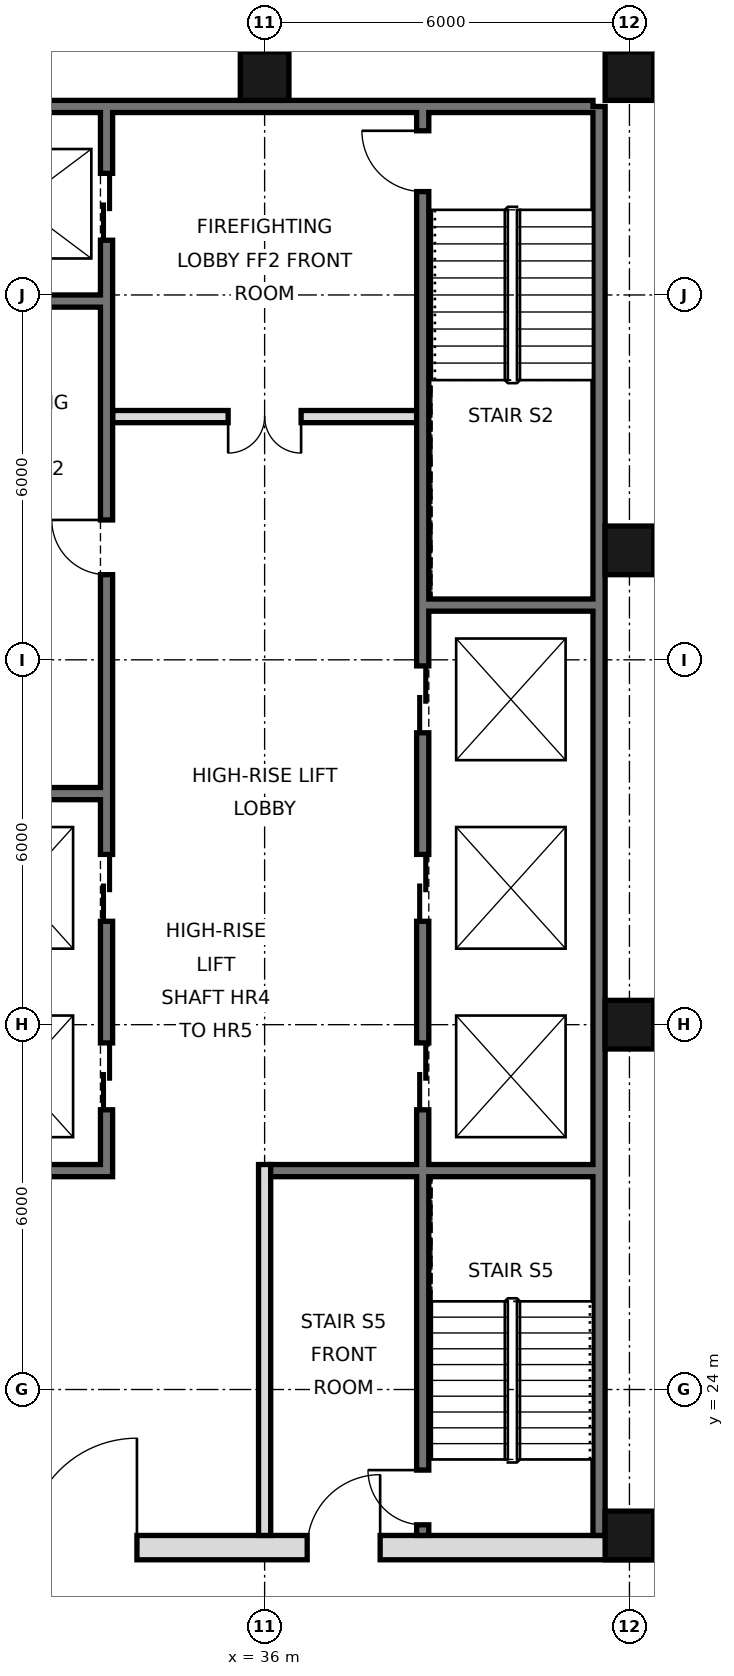
"""IFC4 building model, lengths in metres.
Left out: names, types, materials, properties, quantities, classifications, styles, units other than length and angle.
Written with IfcOpenShell. Run it as: python <this file> out.ifc"""

import sys

from ifc_helpers import new_model, si_unit, direction, frame, frame_2d, origin, origin_2d, place, context, subcontext, project, spatial, rectangle, hollow_rectangle, extrude, element, fill, save


model = new_model("IFC4")
c1 = context("Model", 3, precision=1e-05, world=origin(), true_north=direction((0.0, 1.0)))
c2 = subcontext(c1, "Body", "Model", "MODEL_VIEW")
j1 = project(units=[si_unit("LENGTHUNIT", "METRE"), si_unit("PLANEANGLEUNIT", "RADIAN")], contexts=[c1])
p1 = place(None, origin())
s1 = spatial("IfcSite", under=j1, at=p1, CompositionType="ELEMENT")
p2 = place(p1, origin())
s2 = spatial("IfcBuilding", under=s1, at=p2, CompositionType="ELEMENT")
p3 = place(p2, frame((0.0, 0.0, 294.4)))
s3 = spatial("IfcBuildingStorey", under=s2, at=p3, CompositionType="ELEMENT", Elevation=294.4)
for number, where, z_axis, x_axis in (
    (1, (36.0, 45.6, 0.0), (0.0, 0.0, 1.0), (1.0, 0.0, 0.0)),
    (2, (42.0, 21.6, 0.0), (0.0, 0.0, 1.0), (1.0, 0.0, 0.0)),
    (3, (42.0, 30.0, 0.0), (0.0, 0.0, 1.0), (1.0, 0.0, 0.0)),
    (4, (42.0, 37.8, 0.0), (0.0, 0.0, 1.0), (1.0, 0.0, 0.0)),
    (5, (42.0, 45.6, 0.0), (0.0, 0.0, 1.0), (1.0, 0.0, 0.0)),
):
    element("IfcColumn", number, at=place(p3, frame(where, z_axis=z_axis, x_axis=x_axis)), inside=s3, PredefinedType="COLUMN", context=c2, shape_type="SweptSolid", body=[
        extrude(hollow_rectangle(XDim=0.8, YDim=0.8, WallThickness=0.032, at=origin_2d()), origin(), (0.0, 0.0, 1.0), 3.6),
    ])
p4 = place(p3, frame((41.5, 21.6, 0.0), z_axis=(0.0, 0.0, 1.0), x_axis=(0.0, 1.0, 0.0)))
e6 = element("IfcWall", 6, at=p4, inside=s3, PredefinedType="SOLIDWALL", context=c2, shape_type="SweptSolid", body=[
    extrude(rectangle(XDim=23.5, YDim=0.2, at=frame_2d((11.75, 0.0))), origin(), (0.0, 0.0, 1.0), 3.42),
])
p5 = place(p3, frame((6.6, 45.1, 0.0), z_axis=(0.0, 0.0, 1.0), x_axis=(1.0, 0.0, 0.0)))
e7 = element("IfcWall", 7, at=p5, inside=s3, PredefinedType="SOLIDWALL", context=c2, shape_type="SweptSolid", body=[
    extrude(rectangle(XDim=34.8, YDim=0.2, at=frame_2d((17.4, 0.0))), origin(), (0.0, 0.0, 1.0), 3.42),
])
p6 = place(p3, frame((5.6, 21.4, 0.0), z_axis=(0.0, 0.0, 1.0), x_axis=(1.0, 0.0, 0.0)))
e8 = element("IfcWall", 8, at=p6, inside=s3, PredefinedType="SOLIDWALL", context=c2, shape_type="SweptSolid", body=[
    extrude(rectangle(XDim=36.8, YDim=0.4, at=frame_2d((18.4, 0.0))), origin(), (0.0, 0.0, 1.0), 3.42),
])
p7 = place(p6, frame((8.5, 0.0, 0.0)))
e9 = element("IfcOpeningElement", 9, at=p7, cuts=e8, PredefinedType="OPENING", context=c2, shape_type="SweptSolid", body=[
    extrude(rectangle(XDim=1.8, YDim=2.1, at=frame_2d((0.9, 1.05))), frame((0.0, 0.21, 0.0), z_axis=(0.0, -1.0, 0.0), x_axis=(1.0, 0.0, 0.0)), (0.0, 0.0, 1.0), 0.42),
])
p8 = place(p6, frame((17.5, 0.0, 0.0)))
e10 = element("IfcOpeningElement", 10, at=p8, cuts=e8, PredefinedType="OPENING", context=c2, shape_type="SweptSolid", body=[
    extrude(rectangle(XDim=1.8, YDim=2.1, at=frame_2d((0.9, 1.05))), frame((0.0, 0.21, 0.0), z_axis=(0.0, -1.0, 0.0), x_axis=(1.0, 0.0, 0.0)), (0.0, 0.0, 1.0), 0.42),
])
p9 = place(p6, frame((26.5, 0.0, 0.0)))
e11 = element("IfcOpeningElement", 11, at=p9, cuts=e8, PredefinedType="OPENING", context=c2, shape_type="SweptSolid", body=[
    extrude(rectangle(XDim=1.8, YDim=2.1, at=frame_2d((0.9, 1.05))), frame((0.0, 0.21, 0.0), z_axis=(0.0, -1.0, 0.0), x_axis=(1.0, 0.0, 0.0)), (0.0, 0.0, 1.0), 0.42),
])
p10 = place(p6, frame((4.5, 0.0, 0.0)))
e12 = element("IfcOpeningElement", 12, at=p10, cuts=e8, PredefinedType="OPENING", context=c2, shape_type="SweptSolid", body=[
    extrude(rectangle(XDim=1.2, YDim=2.1, at=frame_2d((0.6, 1.05))), frame((0.0, 0.21, 0.0), z_axis=(0.0, -1.0, 0.0), x_axis=(1.0, 0.0, 0.0)), (0.0, 0.0, 1.0), 0.42),
])
p11 = place(p6, frame((31.1, 0.0, 0.0)))
e13 = element("IfcOpeningElement", 13, at=p11, cuts=e8, PredefinedType="OPENING", context=c2, shape_type="SweptSolid", body=[
    extrude(rectangle(XDim=1.2, YDim=2.1, at=frame_2d((0.6, 1.05))), frame((0.0, 0.21, 0.0), z_axis=(0.0, -1.0, 0.0), x_axis=(1.0, 0.0, 0.0)), (0.0, 0.0, 1.0), 0.42),
])
p12 = place(p3, frame((33.4, 27.5, 0.0), z_axis=(0.0, 0.0, 1.0), x_axis=(0.0, 1.0, 0.0)))
e14 = element("IfcWall", 14, at=p12, inside=s3, PredefinedType="SOLIDWALL", context=c2, shape_type="SweptSolid", body=[
    extrude(rectangle(XDim=17.5, YDim=0.2, at=frame_2d((8.75, 0.0))), origin(), (0.0, 0.0, 1.0), 3.42),
])
p13 = place(p12, frame((1.1, 0.0, 0.0)))
e15 = element("IfcOpeningElement", 15, at=p13, cuts=e14, PredefinedType="OPENING", context=c2, shape_type="SweptSolid", body=[
    extrude(rectangle(XDim=1.1, YDim=2.1, at=frame_2d((0.55, 1.05))), frame((0.0, 0.11, 0.0), z_axis=(0.0, -1.0, 0.0), x_axis=(1.0, 0.0, 0.0)), (0.0, 0.0, 1.0), 0.22),
])
p14 = place(p12, frame((4.2, 0.0, 0.0)))
e16 = element("IfcOpeningElement", 16, at=p14, cuts=e14, PredefinedType="OPENING", context=c2, shape_type="SweptSolid", body=[
    extrude(rectangle(XDim=1.1, YDim=2.1, at=frame_2d((0.55, 1.05))), frame((0.0, 0.11, 0.0), z_axis=(0.0, -1.0, 0.0), x_axis=(1.0, 0.0, 0.0)), (0.0, 0.0, 1.0), 0.22),
])
p15 = place(p12, frame((15.4, 0.0, 0.0)))
e17 = element("IfcOpeningElement", 17, at=p15, cuts=e14, PredefinedType="OPENING", context=c2, shape_type="SweptSolid", body=[
    extrude(rectangle(XDim=1.1, YDim=2.1, at=frame_2d((0.55, 1.05))), frame((0.0, 0.11, 0.0), z_axis=(0.0, -1.0, 0.0), x_axis=(1.0, 0.0, 0.0)), (0.0, 0.0, 1.0), 0.22),
])
p16 = place(p12, frame((9.9, 0.0, 0.0)))
e18 = element("IfcOpeningElement", 18, at=p16, cuts=e14, PredefinedType="OPENING", context=c2, shape_type="SweptSolid", body=[
    extrude(rectangle(XDim=0.9, YDim=2.1, at=frame_2d((0.45, 1.05))), frame((0.0, 0.11, 0.0), z_axis=(0.0, -1.0, 0.0), x_axis=(1.0, 0.0, 0.0)), (0.0, 0.0, 1.0), 0.22),
])
p17 = place(p3, frame((36.0, 21.6, 0.0), z_axis=(0.0, 0.0, 1.0), x_axis=(0.0, 1.0, 0.0)))
e19 = element("IfcWall", 19, at=p17, inside=s3, PredefinedType="PARTITIONING", context=c2, shape_type="SweptSolid", body=[
    extrude(rectangle(XDim=6.1, YDim=0.2, at=frame_2d((3.05, 0.0))), origin(), (0.0, 0.0, 1.0), 3.42),
])
p18 = place(p3, frame((38.6, 21.6, 0.0), z_axis=(0.0, 0.0, 1.0), x_axis=(0.0, 1.0, 0.0)))
e20 = element("IfcWall", 20, at=p18, inside=s3, PredefinedType="SOLIDWALL", context=c2, shape_type="SweptSolid", body=[
    extrude(rectangle(XDim=23.4, YDim=0.2, at=frame_2d((11.7, 0.0))), origin(), (0.0, 0.0, 1.0), 3.42),
])
p19 = place(p18, frame((7.0, 0.0, 0.0)))
e21 = element("IfcOpeningElement", 21, at=p19, cuts=e20, PredefinedType="OPENING", context=c2, shape_type="SweptSolid", body=[
    extrude(rectangle(XDim=1.1, YDim=2.1, at=frame_2d((0.55, 1.05))), frame((0.0, 0.11, 0.0), z_axis=(0.0, -1.0, 0.0), x_axis=(1.0, 0.0, 0.0)), (0.0, 0.0, 1.0), 0.22),
])
p20 = place(p18, frame((10.1, 0.0, 0.0)))
e22 = element("IfcOpeningElement", 22, at=p20, cuts=e20, PredefinedType="OPENING", context=c2, shape_type="SweptSolid", body=[
    extrude(rectangle(XDim=1.1, YDim=2.1, at=frame_2d((0.55, 1.05))), frame((0.0, 0.11, 0.0), z_axis=(0.0, -1.0, 0.0), x_axis=(1.0, 0.0, 0.0)), (0.0, 0.0, 1.0), 0.22),
])
p21 = place(p18, frame((13.2, 0.0, 0.0)))
e23 = element("IfcOpeningElement", 23, at=p21, cuts=e20, PredefinedType="OPENING", context=c2, shape_type="SweptSolid", body=[
    extrude(rectangle(XDim=1.1, YDim=2.1, at=frame_2d((0.55, 1.05))), frame((0.0, 0.11, 0.0), z_axis=(0.0, -1.0, 0.0), x_axis=(1.0, 0.0, 0.0)), (0.0, 0.0, 1.0), 0.22),
])
p22 = place(p18, frame((22.1, 0.0, 0.0)))
e24 = element("IfcOpeningElement", 24, at=p22, cuts=e20, PredefinedType="OPENING", context=c2, shape_type="SweptSolid", body=[
    extrude(rectangle(XDim=1.0, YDim=2.1, at=frame_2d((0.5, 1.05))), frame((0.0, 0.11, 0.0), z_axis=(0.0, -1.0, 0.0), x_axis=(1.0, 0.0, 0.0)), (0.0, 0.0, 1.0), 0.22),
])
p23 = place(p18, frame((0.175, 0.0, 0.0)))
e25 = element("IfcOpeningElement", 25, at=p23, cuts=e20, PredefinedType="OPENING", context=c2, shape_type="SweptSolid", body=[
    extrude(rectangle(XDim=0.9, YDim=2.1, at=frame_2d((0.45, 1.05))), frame((0.0, 0.11, 0.0), z_axis=(0.0, -1.0, 0.0), x_axis=(1.0, 0.0, 0.0)), (0.0, 0.0, 1.0), 0.22),
])
p24 = place(p3, frame((30.6, 27.6, 0.0), z_axis=(0.0, 0.0, 1.0), x_axis=(1.0, 0.0, 0.0)))
e26 = element("IfcWall", 26, at=p24, inside=s3, PredefinedType="SOLIDWALL", context=c2, shape_type="SweptSolid", body=[
    extrude(rectangle(XDim=2.7, YDim=0.2, at=frame_2d((1.35, 0.0))), origin(), (0.0, 0.0, 1.0), 3.42),
])
p25 = place(p3, frame((36.1, 27.6, 0.0), z_axis=(0.0, 0.0, 1.0), x_axis=(1.0, 0.0, 0.0)))
e27 = element("IfcWall", 27, at=p25, inside=s3, PredefinedType="SOLIDWALL", context=c2, shape_type="SweptSolid", body=[
    extrude(rectangle(XDim=5.3, YDim=0.2, at=frame_2d((2.65, 0.0))), origin(), (0.0, 0.0, 1.0), 3.42),
])
for number, where, z_axis, x_axis in (
    (28, (30.6, 33.8, 0.0), (0.0, 0.0, 1.0), (1.0, 0.0, 0.0)),
    (29, (38.7, 36.9, 0.0), (0.0, 0.0, 1.0), (1.0, 0.0, 0.0)),
):
    element("IfcWall", number, at=place(p3, frame(where, z_axis=z_axis, x_axis=x_axis)), inside=s3, PredefinedType="SOLIDWALL", context=c2, shape_type="SweptSolid", body=[
        extrude(rectangle(XDim=2.7, YDim=0.2, at=frame_2d((1.35, 0.0))), origin(), (0.0, 0.0, 1.0), 3.42),
    ])
p26 = place(p3, frame((33.5, 40.0, 0.0), z_axis=(0.0, 0.0, 1.0), x_axis=(1.0, 0.0, 0.0)))
e30 = element("IfcWall", 30, at=p26, inside=s3, PredefinedType="PARTITIONING", context=c2, shape_type="SweptSolid", body=[
    extrude(rectangle(XDim=5.0, YDim=0.2, at=frame_2d((2.5, 0.0))), origin(), (0.0, 0.0, 1.0), 3.42),
])
p27 = place(p26, frame((1.9, 0.0, 0.0)))
e31 = element("IfcOpeningElement", 31, at=p27, cuts=e30, PredefinedType="OPENING", context=c2, shape_type="SweptSolid", body=[
    extrude(rectangle(XDim=1.2, YDim=2.1, at=frame_2d((0.6, 1.05))), frame((0.0, 0.11, 0.0), z_axis=(0.0, -1.0, 0.0), x_axis=(1.0, 0.0, 0.0)), (0.0, 0.0, 1.0), 0.22),
])
p28 = place(p3, frame((30.6, 41.9, 0.0), z_axis=(0.0, 0.0, 1.0), x_axis=(1.0, 0.0, 0.0)))
e32 = element("IfcWall", 32, at=p28, inside=s3, PredefinedType="SOLIDWALL", context=c2, shape_type="SweptSolid", body=[
    extrude(rectangle(XDim=2.7, YDim=0.2, at=frame_2d((1.35, 0.0))), origin(), (0.0, 0.0, 1.0), 3.42),
])
p29 = place(p9, frame((1.8, 0.0, 0.0), z_axis=(0.0, 0.0, 1.0), x_axis=(-1.0, 0.0, 0.0)))
e33 = element("IfcDoor", 33, at=p29, inside=s3, OperationType="SINGLE_SWING_LEFT", PredefinedType="DOOR", context=c2, shape_type="SweptSolid", body=[
    extrude(rectangle(XDim=1.8, YDim=2.1, at=frame_2d((0.9, 1.05))), frame((0.0, 0.025, 0.0), z_axis=(0.0, -1.0, 0.0), x_axis=(1.0, 0.0, 0.0)), (0.0, 0.0, 1.0), 0.05),
])
fill(e11, e33)
p30 = place(p11, frame((1.2, 0.0, 0.0), z_axis=(0.0, 0.0, 1.0), x_axis=(-1.0, 0.0, 0.0)))
e34 = element("IfcDoor", 34, at=p30, inside=s3, OperationType="SINGLE_SWING_LEFT", PredefinedType="DOOR", context=c2, shape_type="SweptSolid", body=[
    extrude(rectangle(XDim=1.2, YDim=2.1, at=frame_2d((0.6, 1.05))), frame((0.0, 0.025, 0.0), z_axis=(0.0, -1.0, 0.0), x_axis=(1.0, 0.0, 0.0)), (0.0, 0.0, 1.0), 0.05),
])
fill(e13, e34)
p31 = place(p27, frame((1.2, 0.0, 0.0), z_axis=(0.0, 0.0, 1.0), x_axis=(-1.0, 0.0, 0.0)))
e35 = element("IfcDoor", 35, at=p31, inside=s3, OperationType="DOUBLE_DOOR_SINGLE_SWING", PredefinedType="DOOR", context=c2, shape_type="SweptSolid", body=[
    extrude(rectangle(XDim=1.2, YDim=2.1, at=frame_2d((0.6, 1.05))), frame((0.0, 0.025, 0.0), z_axis=(0.0, -1.0, 0.0), x_axis=(1.0, 0.0, 0.0)), (0.0, 0.0, 1.0), 0.05),
])
fill(e31, e35)
p32 = place(p19, origin())
e36 = element("IfcDoor", 36, at=p32, inside=s3, OperationType="DOUBLE_DOOR_SLIDING", PredefinedType="DOOR", context=c2, shape_type="SweptSolid", body=[
    extrude(rectangle(XDim=1.1, YDim=2.1, at=frame_2d((0.55, 1.05))), frame((0.0, 0.025, 0.0), z_axis=(0.0, -1.0, 0.0), x_axis=(1.0, 0.0, 0.0)), (0.0, 0.0, 1.0), 0.05),
])
fill(e21, e36)
p33 = place(p20, origin())
e37 = element("IfcDoor", 37, at=p33, inside=s3, OperationType="DOUBLE_DOOR_SLIDING", PredefinedType="DOOR", context=c2, shape_type="SweptSolid", body=[
    extrude(rectangle(XDim=1.1, YDim=2.1, at=frame_2d((0.55, 1.05))), frame((0.0, 0.025, 0.0), z_axis=(0.0, -1.0, 0.0), x_axis=(1.0, 0.0, 0.0)), (0.0, 0.0, 1.0), 0.05),
])
fill(e22, e37)
p34 = place(p21, origin())
e38 = element("IfcDoor", 38, at=p34, inside=s3, OperationType="DOUBLE_DOOR_SLIDING", PredefinedType="DOOR", context=c2, shape_type="SweptSolid", body=[
    extrude(rectangle(XDim=1.1, YDim=2.1, at=frame_2d((0.55, 1.05))), frame((0.0, 0.025, 0.0), z_axis=(0.0, -1.0, 0.0), x_axis=(1.0, 0.0, 0.0)), (0.0, 0.0, 1.0), 0.05),
])
fill(e23, e38)
p35 = place(p13, origin())
e39 = element("IfcDoor", 39, at=p35, inside=s3, OperationType="DOUBLE_DOOR_SLIDING", PredefinedType="DOOR", context=c2, shape_type="SweptSolid", body=[
    extrude(rectangle(XDim=1.1, YDim=2.1, at=frame_2d((0.55, 1.05))), frame((0.0, 0.025, 0.0), z_axis=(0.0, -1.0, 0.0), x_axis=(1.0, 0.0, 0.0)), (0.0, 0.0, 1.0), 0.05),
])
fill(e15, e39)
p36 = place(p14, origin())
e40 = element("IfcDoor", 40, at=p36, inside=s3, OperationType="DOUBLE_DOOR_SLIDING", PredefinedType="DOOR", context=c2, shape_type="SweptSolid", body=[
    extrude(rectangle(XDim=1.1, YDim=2.1, at=frame_2d((0.55, 1.05))), frame((0.0, 0.025, 0.0), z_axis=(0.0, -1.0, 0.0), x_axis=(1.0, 0.0, 0.0)), (0.0, 0.0, 1.0), 0.05),
])
fill(e16, e40)
p37 = place(p15, origin())
e41 = element("IfcDoor", 41, at=p37, inside=s3, OperationType="DOUBLE_DOOR_SLIDING", PredefinedType="DOOR", context=c2, shape_type="SweptSolid", body=[
    extrude(rectangle(XDim=1.1, YDim=2.1, at=frame_2d((0.55, 1.05))), frame((0.0, 0.025, 0.0), z_axis=(0.0, -1.0, 0.0), x_axis=(1.0, 0.0, 0.0)), (0.0, 0.0, 1.0), 0.05),
])
fill(e17, e41)
p38 = place(p22, frame((1.0, 0.0, 0.0), z_axis=(0.0, 0.0, 1.0), x_axis=(-1.0, 0.0, 0.0)))
e42 = element("IfcDoor", 42, at=p38, inside=s3, OperationType="SINGLE_SWING_LEFT", PredefinedType="DOOR", context=c2, shape_type="SweptSolid", body=[
    extrude(rectangle(XDim=1.0, YDim=2.1, at=frame_2d((0.5, 1.05))), frame((0.0, 0.025, 0.0), z_axis=(0.0, -1.0, 0.0), x_axis=(1.0, 0.0, 0.0)), (0.0, 0.0, 1.0), 0.05),
])
fill(e24, e42)
p39 = place(p23, frame((0.9, 0.0, 0.0), z_axis=(0.0, 0.0, 1.0), x_axis=(-1.0, 0.0, 0.0)))
e43 = element("IfcDoor", 43, at=p39, inside=s3, OperationType="SINGLE_SWING_LEFT", PredefinedType="DOOR", context=c2, shape_type="SweptSolid", body=[
    extrude(rectangle(XDim=0.9, YDim=2.1, at=frame_2d((0.45, 1.05))), frame((0.0, 0.025, 0.0), z_axis=(0.0, -1.0, 0.0), x_axis=(1.0, 0.0, 0.0)), (0.0, 0.0, 1.0), 0.05),
])
fill(e25, e43)
p40 = place(p16, frame((0.9, 0.0, 0.0), z_axis=(0.0, 0.0, 1.0), x_axis=(-1.0, 0.0, 0.0)))
e44 = element("IfcDoor", 44, at=p40, inside=s3, OperationType="SINGLE_SWING_LEFT", PredefinedType="DOOR", context=c2, shape_type="SweptSolid", body=[
    extrude(rectangle(XDim=0.9, YDim=2.1, at=frame_2d((0.45, 1.05))), frame((0.0, 0.025, 0.0), z_axis=(0.0, -1.0, 0.0), x_axis=(1.0, 0.0, 0.0)), (0.0, 0.0, 1.0), 0.05),
])
fill(e18, e44)
save(model, sys.argv[1])
